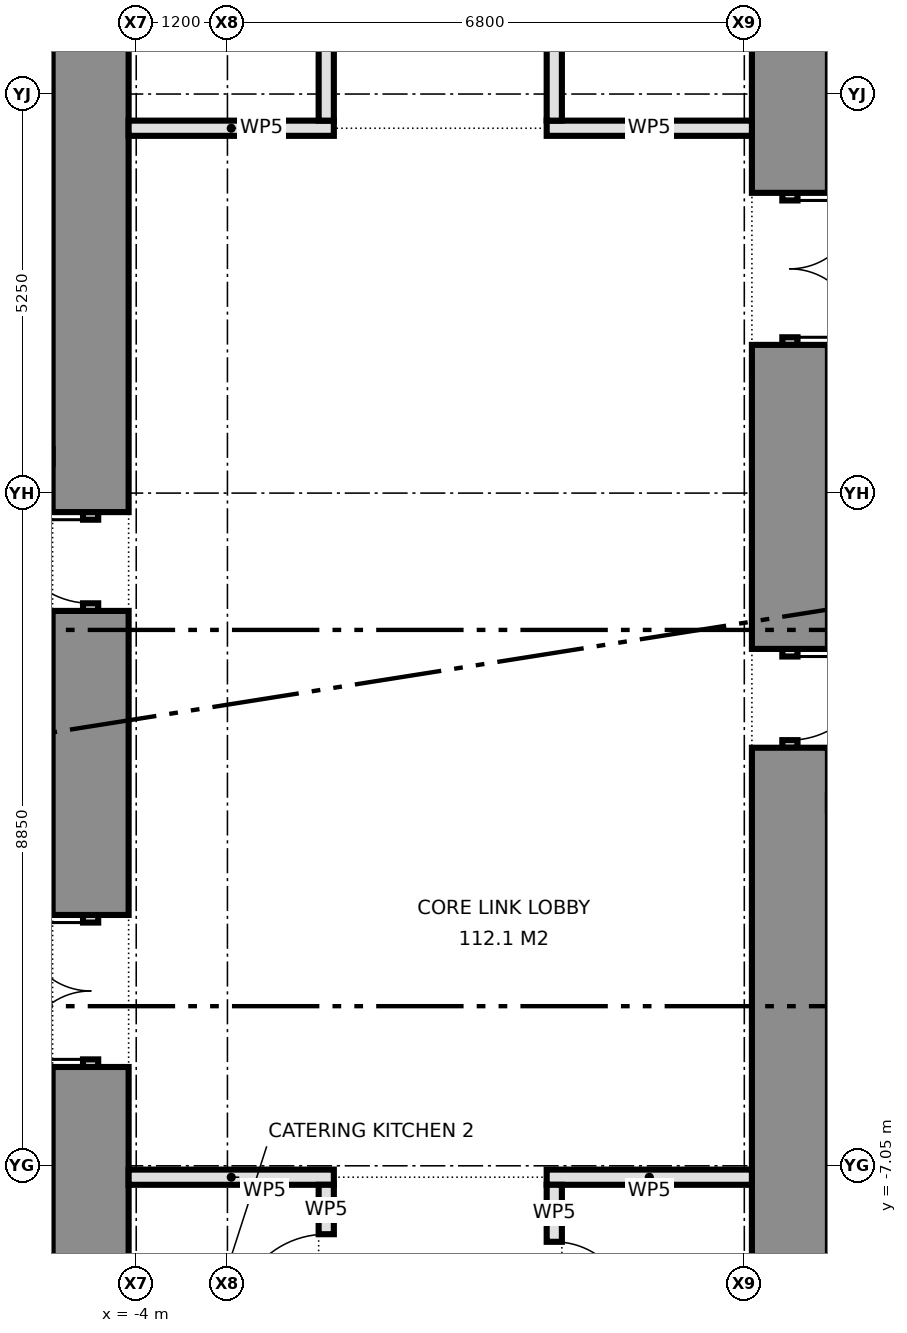
"""IFC4 building model, lengths in metres.
Left out: names, types, materials, properties, quantities, classifications, styles, units other than length and angle.
Written with IfcOpenShell. Run it as: python <this file> out.ifc"""

import sys

from ifc_helpers import new_model, si_unit, direction, frame, frame_2d, origin, place, context, subcontext, project, spatial, rectangle, extrude, element, fill, save


model = new_model("IFC4")
c1 = context("Model", 3, precision=1e-05, world=origin(), true_north=direction((0.0, 1.0)))
c2 = subcontext(c1, "Body", "Model", "MODEL_VIEW")
j1 = project(units=[si_unit("LENGTHUNIT", "METRE"), si_unit("PLANEANGLEUNIT", "RADIAN")], contexts=[c1])
p1 = place(None, origin())
s1 = spatial("IfcSite", under=j1, at=p1, CompositionType="ELEMENT")
p2 = place(p1, origin())
s2 = spatial("IfcBuilding", under=s1, at=p2, CompositionType="ELEMENT")
p3 = place(p2, frame((0.0, 0.0, 112.8)))
s3 = spatial("IfcBuildingStorey", under=s2, at=p3, CompositionType="ELEMENT", Elevation=112.8)
p4 = place(p3, frame((-4.6, -8.9, 0.0), z_axis=(0.0, 0.0, 1.0), x_axis=(0.0, 1.0, 0.0)))
e1 = element("IfcWall", 1, at=p4, inside=s3, PredefinedType="SHEAR", context=c2, shape_type="SweptSolid", body=[
    extrude(rectangle(XDim=3.15, YDim=1.0, at=frame_2d((1.575, 0.0))), origin(), (0.0, 0.0, 1.0), 7.35),
])
p5 = place(p3, frame((-4.6, -5.75, 0.0), z_axis=(0.0, 0.0, 1.0), x_axis=(0.0, 1.0, 0.0)))
e2 = element("IfcWall", 2, at=p5, inside=s3, PredefinedType="PARTITIONING", context=c2, shape_type="SweptSolid", body=[
    extrude(rectangle(XDim=2.0, YDim=0.2, at=frame_2d((1.0, 0.0))), origin(), (0.0, 0.0, 1.0), 2.4),
])
p6 = place(p5, frame((0.1, 0.0, 0.0)))
e3 = element("IfcOpeningElement", 3, at=p6, cuts=e2, PredefinedType="OPENING", context=c2, shape_type="SweptSolid", body=[
    extrude(rectangle(XDim=1.8, YDim=2.1, at=frame_2d((0.9, 1.05))), frame((0.0, 0.11, 0.0), z_axis=(0.0, -1.0, 0.0), x_axis=(1.0, 0.0, 0.0)), (0.0, 0.0, 1.0), 0.22),
])
p7 = place(p3, frame((-4.6, -3.75, 0.0), z_axis=(0.0, 0.0, 1.0), x_axis=(0.0, 1.0, 0.0)))
e4 = element("IfcWall", 4, at=p7, inside=s3, PredefinedType="SHEAR", context=c2, shape_type="SweptSolid", body=[
    extrude(rectangle(XDim=4.0, YDim=1.0, at=frame_2d((2.0, 0.0))), origin(), (0.0, 0.0, 1.0), 7.35),
])
p8 = place(p3, frame((-4.6, 0.25, 0.0), z_axis=(0.0, 0.0, 1.0), x_axis=(0.0, 1.0, 0.0)))
e5 = element("IfcWall", 5, at=p8, inside=s3, PredefinedType="PARTITIONING", context=c2, shape_type="SweptSolid", body=[
    extrude(rectangle(XDim=1.3, YDim=0.2, at=frame_2d((0.65, 0.0))), origin(), (0.0, 0.0, 1.0), 2.4),
])
p9 = place(p8, frame((0.1, 0.0, 0.0)))
e6 = element("IfcOpeningElement", 6, at=p9, cuts=e5, PredefinedType="OPENING", context=c2, shape_type="SweptSolid", body=[
    extrude(rectangle(XDim=1.1, YDim=2.1, at=frame_2d((0.55, 1.05))), frame((0.0, 0.11, 0.0), z_axis=(0.0, -1.0, 0.0), x_axis=(1.0, 0.0, 0.0)), (0.0, 0.0, 1.0), 0.22),
])
p10 = place(p3, frame((-4.6, 1.55, 0.0), z_axis=(0.0, 0.0, 1.0), x_axis=(0.0, 1.0, 0.0)))
e7 = element("IfcWall", 7, at=p10, inside=s3, PredefinedType="SHEAR", context=c2, shape_type="SweptSolid", body=[
    extrude(rectangle(XDim=7.35, YDim=1.0, at=frame_2d((3.675, 0.0))), origin(), (0.0, 0.0, 1.0), 7.35),
])
p11 = place(p3, frame((4.6, 8.9, 0.0), z_axis=(0.0, 0.0, 1.0), x_axis=(0.0, -1.0, 0.0)))
e8 = element("IfcWall", 8, at=p11, inside=s3, PredefinedType="SHEAR", context=c2, shape_type="SweptSolid", body=[
    extrude(rectangle(XDim=3.15, YDim=1.0, at=frame_2d((1.575, 0.0))), origin(), (0.0, 0.0, 1.0), 7.35),
])
p12 = place(p3, frame((4.6, 5.75, 0.0), z_axis=(0.0, 0.0, 1.0), x_axis=(0.0, -1.0, 0.0)))
e9 = element("IfcWall", 9, at=p12, inside=s3, PredefinedType="PARTITIONING", context=c2, shape_type="SweptSolid", body=[
    extrude(rectangle(XDim=2.0, YDim=0.2, at=frame_2d((1.0, 0.0))), origin(), (0.0, 0.0, 1.0), 2.4),
])
p13 = place(p12, frame((0.1, 0.0, 0.0)))
e10 = element("IfcOpeningElement", 10, at=p13, cuts=e9, PredefinedType="OPENING", context=c2, shape_type="SweptSolid", body=[
    extrude(rectangle(XDim=1.8, YDim=2.1, at=frame_2d((0.9, 1.05))), frame((0.0, 0.11, 0.0), z_axis=(0.0, -1.0, 0.0), x_axis=(1.0, 0.0, 0.0)), (0.0, 0.0, 1.0), 0.22),
])
p14 = place(p3, frame((4.6, 3.75, 0.0), z_axis=(0.0, 0.0, 1.0), x_axis=(0.0, -1.0, 0.0)))
e11 = element("IfcWall", 11, at=p14, inside=s3, PredefinedType="SHEAR", context=c2, shape_type="SweptSolid", body=[
    extrude(rectangle(XDim=4.0, YDim=1.0, at=frame_2d((2.0, 0.0))), origin(), (0.0, 0.0, 1.0), 7.35),
])
p15 = place(p3, frame((4.6, -0.25, 0.0), z_axis=(0.0, 0.0, 1.0), x_axis=(0.0, -1.0, 0.0)))
e12 = element("IfcWall", 12, at=p15, inside=s3, PredefinedType="PARTITIONING", context=c2, shape_type="SweptSolid", body=[
    extrude(rectangle(XDim=1.3, YDim=0.2, at=frame_2d((0.65, 0.0))), origin(), (0.0, 0.0, 1.0), 2.4),
])
p16 = place(p15, frame((0.1, 0.0, 0.0)))
e13 = element("IfcOpeningElement", 13, at=p16, cuts=e12, PredefinedType="OPENING", context=c2, shape_type="SweptSolid", body=[
    extrude(rectangle(XDim=1.1, YDim=2.1, at=frame_2d((0.55, 1.05))), frame((0.0, 0.11, 0.0), z_axis=(0.0, -1.0, 0.0), x_axis=(1.0, 0.0, 0.0)), (0.0, 0.0, 1.0), 0.22),
])
p17 = place(p3, frame((4.6, -1.55, 0.0), z_axis=(0.0, 0.0, 1.0), x_axis=(0.0, -1.0, 0.0)))
e14 = element("IfcWall", 14, at=p17, inside=s3, PredefinedType="SHEAR", context=c2, shape_type="SweptSolid", body=[
    extrude(rectangle(XDim=7.35, YDim=1.0, at=frame_2d((3.675, 0.0))), origin(), (0.0, 0.0, 1.0), 7.35),
])
for number, where, z_axis, x_axis in (
    (15, (-4.1, -7.2, 0.0), (0.0, 0.0, 1.0), (1.0, 0.0, 0.0)),
    (16, (1.4, -7.2, 0.0), (0.0, 0.0, 1.0), (1.0, 0.0, 0.0)),
    (17, (-4.1, 6.6, 0.0), (0.0, 0.0, 1.0), (1.0, 0.0, 0.0)),
    (18, (1.4, 6.6, 0.0), (0.0, 0.0, 1.0), (1.0, 0.0, 0.0)),
):
    element("IfcWall", number, at=place(p3, frame(where, z_axis=z_axis, x_axis=x_axis)), inside=s3, PredefinedType="PARTITIONING", context=c2, shape_type="SweptSolid", body=[
        extrude(rectangle(XDim=2.7, YDim=0.2, at=frame_2d((1.35, 0.0))), origin(), (0.0, 0.0, 1.0), 7.35),
    ])
p18 = place(p3, frame((1.5, -9.8, 0.0), z_axis=(0.0, 0.0, 1.0), x_axis=(0.0, 1.0, 0.0)))
e19 = element("IfcWall", 19, at=p18, inside=s3, PredefinedType="PARTITIONING", context=c2, shape_type="SweptSolid", body=[
    extrude(rectangle(XDim=2.5, YDim=0.2, at=frame_2d((1.25, 0.0))), origin(), (0.0, 0.0, 1.0), 7.35),
])
p19 = place(p18, frame((0.75, 0.0, 0.0)))
e20 = element("IfcOpeningElement", 20, at=p19, cuts=e19, PredefinedType="OPENING", context=c2, shape_type="SweptSolid", body=[
    extrude(rectangle(XDim=1.0, YDim=2.1, at=frame_2d((0.5, 1.05))), frame((0.0, 0.11, 0.0), z_axis=(0.0, -1.0, 0.0), x_axis=(1.0, 0.0, 0.0)), (0.0, 0.0, 1.0), 0.22),
])
p20 = place(p3, frame((1.5, 6.7, 0.0), z_axis=(0.0, 0.0, 1.0), x_axis=(0.0, 1.0, 0.0)))
e21 = element("IfcWall", 21, at=p20, inside=s3, PredefinedType="PARTITIONING", context=c2, shape_type="SweptSolid", body=[
    extrude(rectangle(XDim=3.1, YDim=0.2, at=frame_2d((1.55, 0.0))), origin(), (0.0, 0.0, 1.0), 7.35),
])
p21 = place(p20, frame((0.95, 0.0, 0.0)))
e22 = element("IfcOpeningElement", 22, at=p21, cuts=e21, PredefinedType="OPENING", context=c2, shape_type="SweptSolid", body=[
    extrude(rectangle(XDim=1.2, YDim=2.1, at=frame_2d((0.6, 1.05))), frame((0.0, 0.11, 0.0), z_axis=(0.0, -1.0, 0.0), x_axis=(1.0, 0.0, 0.0)), (0.0, 0.0, 1.0), 0.22),
])
p22 = place(p3, frame((-1.5, -9.8, 0.0), z_axis=(0.0, 0.0, 1.0), x_axis=(0.0, 1.0, 0.0)))
e23 = element("IfcWall", 23, at=p22, inside=s3, PredefinedType="PARTITIONING", context=c2, shape_type="SweptSolid", body=[
    extrude(rectangle(XDim=2.5, YDim=0.2, at=frame_2d((1.25, 0.0))), origin(), (0.0, 0.0, 1.0), 7.35),
])
p23 = place(p22, frame((0.65, 0.0, 0.0)))
e24 = element("IfcOpeningElement", 24, at=p23, cuts=e23, PredefinedType="OPENING", context=c2, shape_type="SweptSolid", body=[
    extrude(rectangle(XDim=1.2, YDim=2.1, at=frame_2d((0.6, 1.05))), frame((0.0, 0.11, 0.0), z_axis=(0.0, -1.0, 0.0), x_axis=(1.0, 0.0, 0.0)), (0.0, 0.0, 1.0), 0.22),
])
p24 = place(p3, frame((-1.5, 6.7, 0.0), z_axis=(0.0, 0.0, 1.0), x_axis=(0.0, 1.0, 0.0)))
e25 = element("IfcWall", 25, at=p24, inside=s3, PredefinedType="PARTITIONING", context=c2, shape_type="SweptSolid", body=[
    extrude(rectangle(XDim=3.1, YDim=0.2, at=frame_2d((1.55, 0.0))), origin(), (0.0, 0.0, 1.0), 7.35),
])
p25 = place(p24, frame((1.05, 0.0, 0.0)))
e26 = element("IfcOpeningElement", 26, at=p25, cuts=e25, PredefinedType="OPENING", context=c2, shape_type="SweptSolid", body=[
    extrude(rectangle(XDim=1.0, YDim=2.1, at=frame_2d((0.5, 1.05))), frame((0.0, 0.11, 0.0), z_axis=(0.0, -1.0, 0.0), x_axis=(1.0, 0.0, 0.0)), (0.0, 0.0, 1.0), 0.22),
])
p26 = place(p6, origin())
e27 = element("IfcDoor", 27, at=p26, inside=s3, OperationType="DOUBLE_DOOR_SINGLE_SWING", PredefinedType="DOOR", context=c2, shape_type="SweptSolid", body=[
    extrude(rectangle(XDim=1.8, YDim=2.1, at=frame_2d((0.9, 1.05))), frame((0.0, 0.025, 0.0), z_axis=(0.0, -1.0, 0.0), x_axis=(1.0, 0.0, 0.0)), (0.0, 0.0, 1.0), 0.05),
])
fill(e3, e27)
p27 = place(p9, origin())
e28 = element("IfcDoor", 28, at=p27, inside=s3, OperationType="SINGLE_SWING_RIGHT", PredefinedType="DOOR", context=c2, shape_type="SweptSolid", body=[
    extrude(rectangle(XDim=1.1, YDim=2.1, at=frame_2d((0.55, 1.05))), frame((0.0, 0.025, 0.0), z_axis=(0.0, -1.0, 0.0), x_axis=(1.0, 0.0, 0.0)), (0.0, 0.0, 1.0), 0.05),
])
fill(e6, e28)
p28 = place(p13, origin())
e29 = element("IfcDoor", 29, at=p28, inside=s3, OperationType="DOUBLE_DOOR_SINGLE_SWING", PredefinedType="DOOR", context=c2, shape_type="SweptSolid", body=[
    extrude(rectangle(XDim=1.8, YDim=2.1, at=frame_2d((0.9, 1.05))), frame((0.0, 0.025, 0.0), z_axis=(0.0, -1.0, 0.0), x_axis=(1.0, 0.0, 0.0)), (0.0, 0.0, 1.0), 0.05),
])
fill(e10, e29)
p29 = place(p16, origin())
e30 = element("IfcDoor", 30, at=p29, inside=s3, OperationType="SINGLE_SWING_LEFT", PredefinedType="DOOR", context=c2, shape_type="SweptSolid", body=[
    extrude(rectangle(XDim=1.1, YDim=2.1, at=frame_2d((0.55, 1.05))), frame((0.0, 0.025, 0.0), z_axis=(0.0, -1.0, 0.0), x_axis=(1.0, 0.0, 0.0)), (0.0, 0.0, 1.0), 0.05),
])
fill(e13, e30)
p30 = place(p23, origin())
e31 = element("IfcDoor", 31, at=p30, inside=s3, OperationType="SINGLE_SWING_LEFT", PredefinedType="DOOR", context=c2, shape_type="SweptSolid", body=[
    extrude(rectangle(XDim=1.2, YDim=2.1, at=frame_2d((0.6, 1.05))), frame((0.0, 0.025, 0.0), z_axis=(0.0, -1.0, 0.0), x_axis=(1.0, 0.0, 0.0)), (0.0, 0.0, 1.0), 0.05),
])
fill(e24, e31)
p31 = place(p19, frame((1.0, 0.0, 0.0), z_axis=(0.0, 0.0, 1.0), x_axis=(-1.0, 0.0, 0.0)))
e32 = element("IfcDoor", 32, at=p31, inside=s3, OperationType="SINGLE_SWING_RIGHT", PredefinedType="DOOR", context=c2, shape_type="SweptSolid", body=[
    extrude(rectangle(XDim=1.0, YDim=2.1, at=frame_2d((0.5, 1.05))), frame((0.0, 0.025, 0.0), z_axis=(0.0, -1.0, 0.0), x_axis=(1.0, 0.0, 0.0)), (0.0, 0.0, 1.0), 0.05),
])
fill(e20, e32)
save(model, sys.argv[1])
